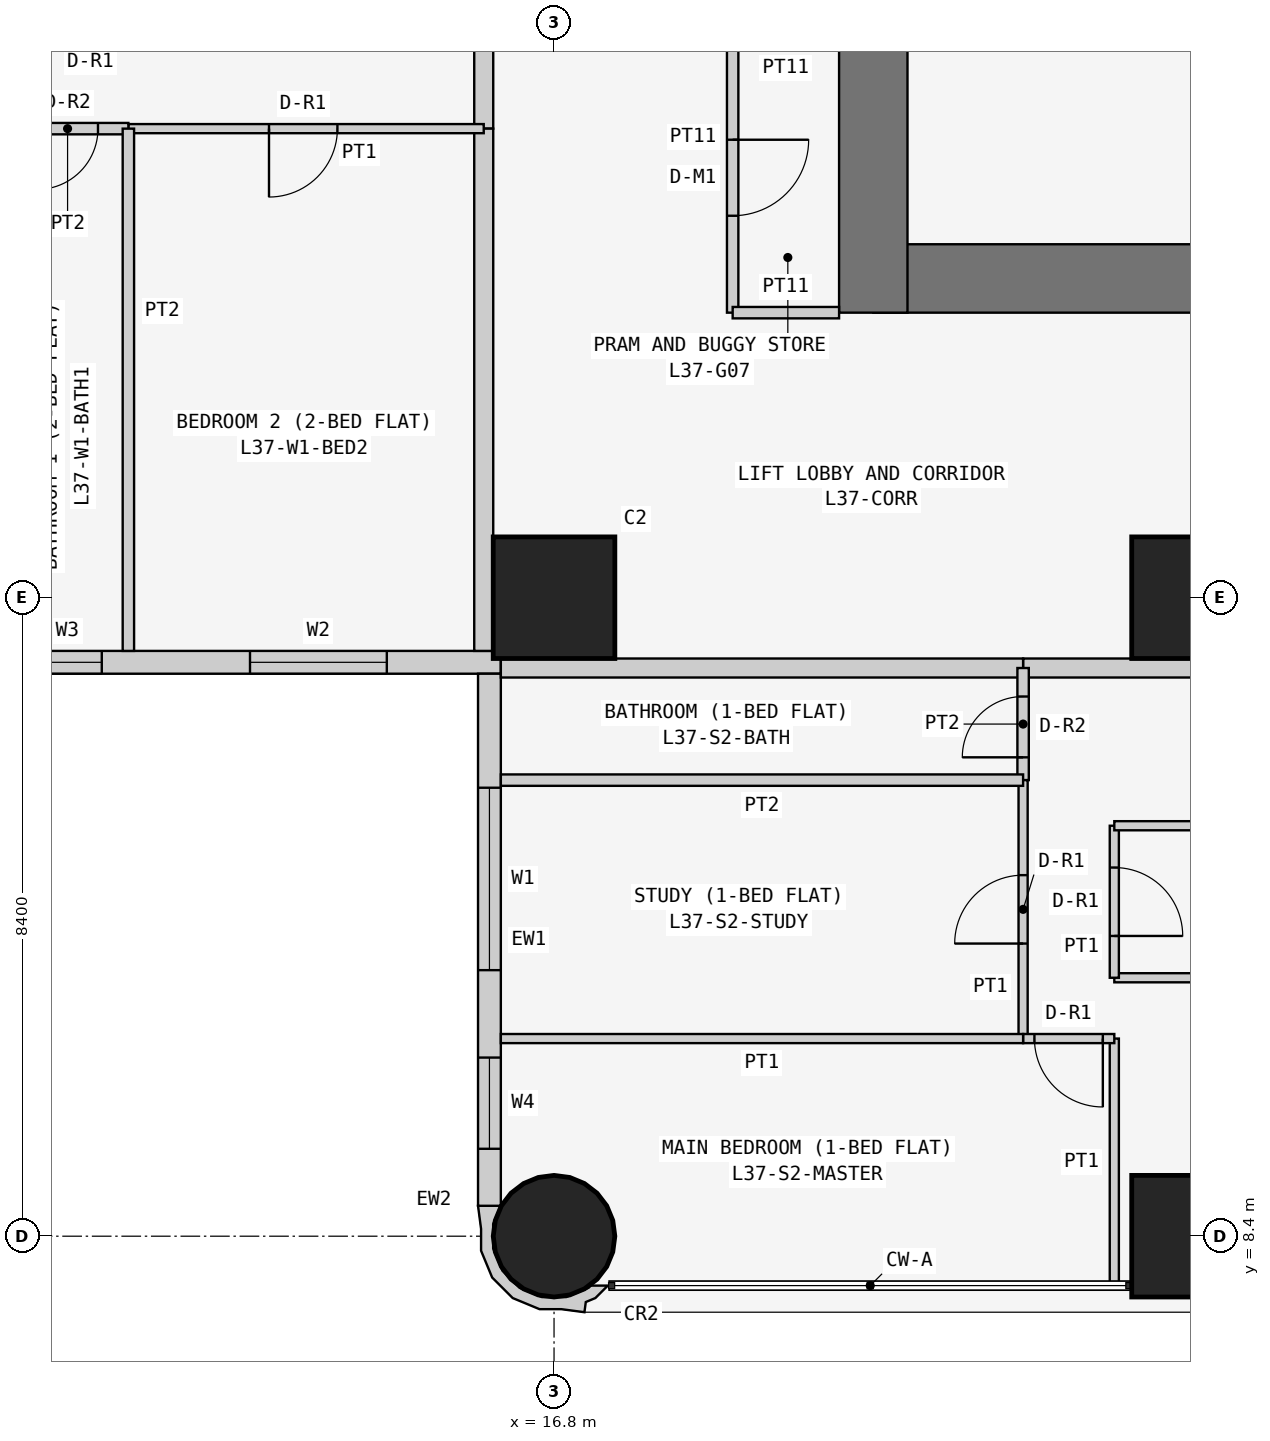
"""IFC4 building model, lengths in metres.
Left out: names, types, materials, properties, quantities, classifications, styles, units other than length and angle.
Written with IfcOpenShell. Run it as: python <this file> out.ifc"""

import sys

from ifc_helpers import new_model, si_unit, direction, frame, frame_2d, origin, origin_2d, place, context, subcontext, project, spatial, polyline, rectangle, circle, outline, extrude, element, fill, save


model = new_model("IFC4")
c1 = context("Model", 3, precision=1e-05, world=origin(), true_north=direction((0.0, 1.0)))
c2 = subcontext(c1, "Body", "Model", "MODEL_VIEW")
j1 = project(units=[si_unit("LENGTHUNIT", "METRE"), si_unit("PLANEANGLEUNIT", "RADIAN")], contexts=[c1])
p1 = place(None, origin())
s1 = spatial("IfcSite", under=j1, at=p1, CompositionType="ELEMENT")
p2 = place(p1, origin())
s2 = spatial("IfcBuilding", under=s1, at=p2, CompositionType="ELEMENT")
p3 = place(p2, frame((0.0, 0.0, 144.9)))
s3 = spatial("IfcBuildingStorey", under=s2, at=p3, CompositionType="ELEMENT", Elevation=144.9)
p4 = place(p3, frame((16.8, 8.4, 0.0), z_axis=(0.0, 0.0, 1.0), x_axis=(1.0, 0.0, 0.0)))
e1 = element("IfcColumn", 1, at=p4, inside=s3, PredefinedType="COLUMN", context=c2, shape_type="SweptSolid", body=[
    extrude(circle(Radius=0.8, at=origin_2d()), origin(), (0.0, 0.0, 1.0), 3.6),
])
for number, where, z_axis, x_axis in (
    (2, (16.8, 16.8, 0.0), (0.0, 0.0, 1.0), (1.0, 0.0, 0.0)),
    (3, (25.2, 8.4, 0.0), (0.0, 0.0, 1.0), (1.0, 0.0, 0.0)),
    (4, (25.2, 16.8, 0.0), (0.0, 0.0, 1.0), (1.0, 0.0, 0.0)),
):
    element("IfcColumn", number, at=place(p3, frame(where, z_axis=z_axis, x_axis=x_axis)), inside=s3, PredefinedType="COLUMN", context=c2, shape_type="SweptSolid", body=[
        extrude(rectangle(XDim=1.6, YDim=1.6, at=origin_2d()), origin(), (0.0, 0.0, 1.0), 3.6),
    ])
p5 = place(p3, frame((21.0, 21.0, 0.0), z_axis=(0.0, 0.0, 1.0), x_axis=(1.0, 0.0, 0.0)))
e5 = element("IfcWall", 5, at=p5, inside=s3, PredefinedType="SHEAR", context=c2, shape_type="SweptSolid", body=[
    extrude(rectangle(XDim=17.25, YDim=0.9, at=frame_2d((8.625, 0.0))), origin(), (0.0, 0.0, 1.0), 3.6),
])
p6 = place(p3, frame((21.0, 37.8, 0.0), z_axis=(0.0, 0.0, 1.0), x_axis=(0.0, -1.0, 0.0)))
e6 = element("IfcWall", 6, at=p6, inside=s3, PredefinedType="SHEAR", context=c2, shape_type="SweptSolid", body=[
    extrude(rectangle(XDim=17.25, YDim=0.9, at=frame_2d((8.625, 0.0))), origin(), (0.0, 0.0, 1.0), 3.6),
])
p7 = place(p6, frame((5.4, 0.0, 0.0)))
e7 = element("IfcOpeningElement", 7, at=p7, cuts=e6, PredefinedType="OPENING", context=c2, shape_type="SweptSolid", body=[
    extrude(rectangle(XDim=1.2, YDim=2.1, at=frame_2d((0.6, 1.05))), frame((0.0, 0.46, 0.0), z_axis=(0.0, -1.0, 0.0), x_axis=(1.0, 0.0, 0.0)), (0.0, 0.0, 1.0), 0.92),
])
p8 = place(p3, frame((0.4, 15.95, 0.0), z_axis=(0.0, 0.0, 1.0), x_axis=(1.0, 0.0, 0.0)))
e8 = element("IfcWall", 8, at=p8, inside=s3, PredefinedType="SOLIDWALL", context=c2, shape_type="SweptSolid", body=[
    extrude(rectangle(XDim=15.7, YDim=0.3, at=frame_2d((7.85, 0.0))), origin(), (0.0, 0.0, 1.0), 3.45),
])
p9 = place(p8, frame((12.4, 0.0, 0.9)))
e9 = element("IfcOpeningElement", 9, at=p9, cuts=e8, PredefinedType="OPENING", context=c2, shape_type="SweptSolid", body=[
    extrude(rectangle(XDim=1.8, YDim=1.5, at=frame_2d((0.9, 0.75))), frame((0.0, 0.16, 0.0), z_axis=(0.0, -1.0, 0.0), x_axis=(1.0, 0.0, 0.0)), (0.0, 0.0, 1.0), 0.32),
])
p10 = place(p8, frame((9.55, 0.0, 1.5)))
e10 = element("IfcOpeningElement", 10, at=p10, cuts=e8, PredefinedType="OPENING", context=c2, shape_type="SweptSolid", body=[
    extrude(rectangle(XDim=0.9, YDim=0.7, at=frame_2d((0.45, 0.35))), frame((0.0, 0.16, 0.0), z_axis=(0.0, -1.0, 0.0), x_axis=(1.0, 0.0, 0.0)), (0.0, 0.0, 1.0), 0.32),
])
p11 = place(p8, frame((5.1, 0.0, 0.9)))
e11 = element("IfcOpeningElement", 11, at=p11, cuts=e8, PredefinedType="OPENING", context=c2, shape_type="SweptSolid", body=[
    extrude(rectangle(XDim=1.8, YDim=1.5, at=frame_2d((0.9, 0.75))), frame((0.0, 0.16, 0.0), z_axis=(0.0, -1.0, 0.0), x_axis=(1.0, 0.0, 0.0)), (0.0, 0.0, 1.0), 0.32),
])
p12 = place(p8, frame((2.0, 0.0, 0.0)))
e12 = element("IfcOpeningElement", 12, at=p12, cuts=e8, PredefinedType="OPENING", context=c2, shape_type="SweptSolid", body=[
    extrude(rectangle(XDim=0.9, YDim=2.4, at=frame_2d((0.45, 1.2))), frame((0.0, 0.16, 0.0), z_axis=(0.0, -1.0, 0.0), x_axis=(1.0, 0.0, 0.0)), (0.0, 0.0, 1.0), 0.32),
])
p13 = place(p8, frame((0.7, 0.0, 0.9)))
e13 = element("IfcOpeningElement", 13, at=p13, cuts=e8, PredefinedType="OPENING", context=c2, shape_type="SweptSolid", body=[
    extrude(rectangle(XDim=1.2, YDim=1.5, at=frame_2d((0.6, 0.75))), frame((0.0, 0.16, 0.0), z_axis=(0.0, -1.0, 0.0), x_axis=(1.0, 0.0, 0.0)), (0.0, 0.0, 1.0), 0.32),
])
p14 = place(p3, frame((15.95, 15.8, 0.0), z_axis=(0.0, 0.0, 1.0), x_axis=(0.0, -1.0, 0.0)))
e14 = element("IfcWall", 14, at=p14, inside=s3, PredefinedType="SOLIDWALL", context=c2, shape_type="SweptSolid", body=[
    extrude(rectangle(XDim=7.0, YDim=0.3, at=frame_2d((3.5, 0.0))), origin(), (0.0, 0.0, 1.0), 3.45),
])
p15 = place(p14, frame((1.5, 0.0, 0.9)))
e15 = element("IfcOpeningElement", 15, at=p15, cuts=e14, PredefinedType="OPENING", context=c2, shape_type="SweptSolid", body=[
    extrude(rectangle(XDim=2.4, YDim=1.5, at=frame_2d((1.2, 0.75))), frame((0.0, 0.16, 0.0), z_axis=(0.0, -1.0, 0.0), x_axis=(1.0, 0.0, 0.0)), (0.0, 0.0, 1.0), 0.32),
])
p16 = place(p14, frame((5.05, 0.0, 0.9)))
e16 = element("IfcOpeningElement", 16, at=p16, cuts=e14, PredefinedType="OPENING", context=c2, shape_type="SweptSolid", body=[
    extrude(rectangle(XDim=1.2, YDim=1.5, at=frame_2d((0.6, 0.75))), frame((0.0, 0.16, 0.0), z_axis=(0.0, -1.0, 0.0), x_axis=(1.0, 0.0, 0.0)), (0.0, 0.0, 1.0), 0.32),
])
p17 = place(p3, frame((15.983, 8.727, 0.0), z_axis=(0.0, 0.0, 1.0), x_axis=(-0.343276641956, -0.93923434088, 0.0)))
e17 = element("IfcWall", 17, at=p17, inside=s3, PredefinedType="SOLIDWALL", context=c2, shape_type="SweptSolid", body=[
    extrude(outline(polyline([(0.829, 1.599), (0.697, 1.569), (0.604, 1.67), (0.394, 1.767), (0.471, 1.556), (0.509, 1.539), (0.724, 1.304), (0.833, 1.005), (0.82, 0.686), (0.686, 0.397), (0.451, 0.182), (0.152, 0.073), (-0.116, 0.084), (-0.127, 0.078), (-0.146, 0.071), (-0.006, -0.197), (0.266, -0.055), (0.535, 0.044), (0.817, 0.302), (0.978, 0.648), (0.994, 1.03), (0.895, 1.3), (0.829, 1.599)])), origin(), (0.0, 0.0, 1.0), 3.45),
])
p18 = place(p3, frame((19.15, 24.1, 0.0), z_axis=(0.0, 0.0, 1.0), x_axis=(0.0, -1.0, 0.0)))
e18 = element("IfcWall", 18, at=p18, inside=s3, PredefinedType="PARTITIONING", context=c2, shape_type="SweptSolid", body=[
    extrude(rectangle(XDim=3.55, YDim=0.15, at=frame_2d((1.775, 0.0))), origin(), (0.0, 0.0, 1.0), 3.45),
])
p19 = place(p18, frame((1.275, 0.0, 0.0)))
e19 = element("IfcOpeningElement", 19, at=p19, cuts=e18, PredefinedType="OPENING", context=c2, shape_type="SweptSolid", body=[
    extrude(rectangle(XDim=1.0, YDim=2.1, at=frame_2d((0.5, 1.05))), frame((0.0, 0.085, 0.0), z_axis=(0.0, -1.0, 0.0), x_axis=(1.0, 0.0, 0.0)), (0.0, 0.0, 1.0), 0.17),
])
p20 = place(p3, frame((19.15, 20.55, 0.0), z_axis=(0.0, 0.0, 1.0), x_axis=(1.0, 0.0, 0.0)))
e20 = element("IfcWall", 20, at=p20, inside=s3, PredefinedType="PARTITIONING", context=c2, shape_type="SweptSolid", body=[
    extrude(rectangle(XDim=1.4, YDim=0.15, at=frame_2d((0.7, 0.0))), origin(), (0.0, 0.0, 1.0), 3.45),
])
p21 = place(p3, frame((29.4, 15.875, 0.0), z_axis=(0.0, 0.0, 1.0), x_axis=(-1.0, 0.0, 0.0)))
e21 = element("IfcWall", 21, at=p21, inside=s3, PredefinedType="PARTITIONING", context=c2, shape_type="SweptSolid", body=[
    extrude(rectangle(XDim=6.429, YDim=0.25, at=frame_2d((3.214, 0.0))), origin(), (0.0, 0.0, 1.0), 3.45),
])
p22 = place(p21, frame((0.5, 0.0, 0.0)))
e22 = element("IfcOpeningElement", 22, at=p22, cuts=e21, PredefinedType="OPENING", context=c2, shape_type="SweptSolid", body=[
    extrude(rectangle(XDim=1.0, YDim=2.1, at=frame_2d((0.5, 1.05))), frame((0.0, 0.135, 0.0), z_axis=(0.0, -1.0, 0.0), x_axis=(1.0, 0.0, 0.0)), (0.0, 0.0, 1.0), 0.27),
])
p23 = place(p3, frame((22.971, 15.875, 0.0), z_axis=(0.0, 0.0, 1.0), x_axis=(-1.0, 0.0, 0.0)))
e23 = element("IfcWall", 23, at=p23, inside=s3, PredefinedType="PARTITIONING", context=c2, shape_type="SweptSolid", body=[
    extrude(rectangle(XDim=6.871, YDim=0.25, at=frame_2d((3.436, 0.0))), origin(), (0.0, 0.0, 1.0), 3.45),
])
p24 = place(p3, frame((15.875, 22.971, 0.0), z_axis=(0.0, 0.0, 1.0), x_axis=(0.0, 1.0, 0.0)))
e24 = element("IfcWall", 24, at=p24, inside=s3, PredefinedType="PARTITIONING", context=c2, shape_type="SweptSolid", body=[
    extrude(rectangle(XDim=1.2, YDim=0.25, at=frame_2d((0.6, 0.0))), origin(), (0.0, 0.0, 1.0), 3.45),
])
p25 = place(p3, frame((15.875, 16.1, 0.0), z_axis=(0.0, 0.0, 1.0), x_axis=(0.0, 1.0, 0.0)))
e25 = element("IfcWall", 25, at=p25, inside=s3, PredefinedType="PARTITIONING", context=c2, shape_type="SweptSolid", body=[
    extrude(rectangle(XDim=6.871, YDim=0.25, at=frame_2d((3.436, 0.0))), origin(), (0.0, 0.0, 1.0), 3.45),
])
p26 = place(p3, frame((29.4, 11.8, 0.0), z_axis=(0.0, 0.0, 1.0), x_axis=(-1.0, 0.0, 0.0)))
e26 = element("IfcWall", 26, at=p26, inside=s3, PredefinedType="PARTITIONING", context=c2, shape_type="SweptSolid", body=[
    extrude(rectangle(XDim=5.229, YDim=0.12, at=frame_2d((2.615, 0.0))), origin(), (0.0, 0.0, 1.0), 3.45),
])
p27 = place(p3, frame((24.171, 11.8, 0.0), z_axis=(0.0, 0.0, 1.0), x_axis=(0.0, 1.0, 0.0)))
e27 = element("IfcWall", 27, at=p27, inside=s3, PredefinedType="PARTITIONING", context=c2, shape_type="SweptSolid", body=[
    extrude(rectangle(XDim=2.0, YDim=0.12, at=frame_2d((1.0, 0.0))), origin(), (0.0, 0.0, 1.0), 3.45),
])
p28 = place(p27, frame((0.55, 0.0, 0.0)))
e28 = element("IfcOpeningElement", 28, at=p28, cuts=e27, PredefinedType="OPENING", context=c2, shape_type="SweptSolid", body=[
    extrude(rectangle(XDim=0.9, YDim=2.1, at=frame_2d((0.45, 1.05))), frame((0.0, 0.07, 0.0), z_axis=(0.0, -1.0, 0.0), x_axis=(1.0, 0.0, 0.0)), (0.0, 0.0, 1.0), 0.14),
])
p29 = place(p3, frame((24.171, 13.8, 0.0), z_axis=(0.0, 0.0, 1.0), x_axis=(1.0, 0.0, 0.0)))
e29 = element("IfcWall", 29, at=p29, inside=s3, PredefinedType="PARTITIONING", context=c2, shape_type="SweptSolid", body=[
    extrude(rectangle(XDim=5.229, YDim=0.12, at=frame_2d((2.615, 0.0))), origin(), (0.0, 0.0, 1.0), 3.45),
])
p30 = place(p3, frame((22.971, 14.4, 0.0), z_axis=(0.0, 0.0, 1.0), x_axis=(0.0, 1.0, 0.0)))
e30 = element("IfcWall", 30, at=p30, inside=s3, PredefinedType="PARTITIONING", context=c2, shape_type="SweptSolid", body=[
    extrude(rectangle(XDim=1.475, YDim=0.15, at=frame_2d((0.738, 0.0))), origin(), (0.0, 0.0, 1.0), 3.45),
])
p31 = place(p30, frame((0.3, 0.0, 0.0)))
e31 = element("IfcOpeningElement", 31, at=p31, cuts=e30, PredefinedType="OPENING", context=c2, shape_type="SweptSolid", body=[
    extrude(rectangle(XDim=0.8, YDim=2.1, at=frame_2d((0.4, 1.05))), frame((0.0, 0.085, 0.0), z_axis=(0.0, -1.0, 0.0), x_axis=(1.0, 0.0, 0.0)), (0.0, 0.0, 1.0), 0.17),
])
p32 = place(p3, frame((22.971, 11.0, 0.0), z_axis=(0.0, 0.0, 1.0), x_axis=(0.0, 1.0, 0.0)))
e32 = element("IfcWall", 32, at=p32, inside=s3, PredefinedType="PARTITIONING", context=c2, shape_type="SweptSolid", body=[
    extrude(rectangle(XDim=3.4, YDim=0.12, at=frame_2d((1.7, 0.0))), origin(), (0.0, 0.0, 1.0), 3.45),
])
p33 = place(p32, frame((1.25, 0.0, 0.0)))
e33 = element("IfcOpeningElement", 33, at=p33, cuts=e32, PredefinedType="OPENING", context=c2, shape_type="SweptSolid", body=[
    extrude(rectangle(XDim=0.9, YDim=2.1, at=frame_2d((0.45, 1.05))), frame((0.0, 0.07, 0.0), z_axis=(0.0, -1.0, 0.0), x_axis=(1.0, 0.0, 0.0)), (0.0, 0.0, 1.0), 0.14),
])
p34 = place(p3, frame((24.171, 7.75, 0.0), z_axis=(0.0, 0.0, 1.0), x_axis=(0.0, 1.0, 0.0)))
e34 = element("IfcWall", 34, at=p34, inside=s3, PredefinedType="PARTITIONING", context=c2, shape_type="SweptSolid", body=[
    extrude(rectangle(XDim=3.25, YDim=0.12, at=frame_2d((1.625, 0.0))), origin(), (0.0, 0.0, 1.0), 3.45),
])
p35 = place(p3, frame((24.171, 11.0, 0.0), z_axis=(0.0, 0.0, 1.0), x_axis=(-1.0, 0.0, 0.0)))
e35 = element("IfcWall", 35, at=p35, inside=s3, PredefinedType="PARTITIONING", context=c2, shape_type="SweptSolid", body=[
    extrude(rectangle(XDim=1.2, YDim=0.12, at=frame_2d((0.6, 0.0))), origin(), (0.0, 0.0, 1.0), 3.45),
])
p36 = place(p35, frame((0.151, 0.0, 0.0)))
e36 = element("IfcOpeningElement", 36, at=p36, cuts=e35, PredefinedType="OPENING", context=c2, shape_type="SweptSolid", body=[
    extrude(rectangle(XDim=0.9, YDim=2.1, at=frame_2d((0.45, 1.05))), frame((0.0, 0.07, 0.0), z_axis=(0.0, -1.0, 0.0), x_axis=(1.0, 0.0, 0.0)), (0.0, 0.0, 1.0), 0.14),
])
p37 = place(p3, frame((22.971, 14.4, 0.0), z_axis=(0.0, 0.0, 1.0), x_axis=(-1.0, 0.0, 0.0)))
e37 = element("IfcWall", 37, at=p37, inside=s3, PredefinedType="PARTITIONING", context=c2, shape_type="SweptSolid", body=[
    extrude(rectangle(XDim=6.871, YDim=0.15, at=frame_2d((3.436, 0.0))), origin(), (0.0, 0.0, 1.0), 3.45),
])
p38 = place(p3, frame((22.971, 11.0, 0.0), z_axis=(0.0, 0.0, 1.0), x_axis=(-1.0, 0.0, 0.0)))
e38 = element("IfcWall", 38, at=p38, inside=s3, PredefinedType="PARTITIONING", context=c2, shape_type="SweptSolid", body=[
    extrude(rectangle(XDim=6.871, YDim=0.12, at=frame_2d((3.436, 0.0))), origin(), (0.0, 0.0, 1.0), 3.45),
])
p39 = place(p3, frame((11.2, 22.971, 0.0), z_axis=(0.0, 0.0, 1.0), x_axis=(1.0, 0.0, 0.0)))
e39 = element("IfcWall", 39, at=p39, inside=s3, PredefinedType="PARTITIONING", context=c2, shape_type="SweptSolid", body=[
    extrude(rectangle(XDim=4.675, YDim=0.12, at=frame_2d((2.337, 0.0))), origin(), (0.0, 0.0, 1.0), 3.45),
])
p40 = place(p39, frame((1.85, 0.0, 0.0)))
e40 = element("IfcOpeningElement", 40, at=p40, cuts=e39, PredefinedType="OPENING", context=c2, shape_type="SweptSolid", body=[
    extrude(rectangle(XDim=0.9, YDim=2.1, at=frame_2d((0.45, 1.05))), frame((0.0, 0.07, 0.0), z_axis=(0.0, -1.0, 0.0), x_axis=(1.0, 0.0, 0.0)), (0.0, 0.0, 1.0), 0.14),
])
p41 = place(p3, frame((9.6, 22.971, 0.0), z_axis=(0.0, 0.0, 1.0), x_axis=(1.0, 0.0, 0.0)))
e41 = element("IfcWall", 41, at=p41, inside=s3, PredefinedType="PARTITIONING", context=c2, shape_type="SweptSolid", body=[
    extrude(rectangle(XDim=1.6, YDim=0.15, at=frame_2d((0.8, 0.0))), origin(), (0.0, 0.0, 1.0), 3.45),
])
p42 = place(p41, frame((0.4, 0.0, 0.0)))
e42 = element("IfcOpeningElement", 42, at=p42, cuts=e41, PredefinedType="OPENING", context=c2, shape_type="SweptSolid", body=[
    extrude(rectangle(XDim=0.8, YDim=2.1, at=frame_2d((0.4, 1.05))), frame((0.0, 0.085, 0.0), z_axis=(0.0, -1.0, 0.0), x_axis=(1.0, 0.0, 0.0)), (0.0, 0.0, 1.0), 0.17),
])
p43 = place(p3, frame((11.2, 22.971, 0.0), z_axis=(0.0, 0.0, 1.0), x_axis=(0.0, -1.0, 0.0)))
e43 = element("IfcWall", 43, at=p43, inside=s3, PredefinedType="PARTITIONING", context=c2, shape_type="SweptSolid", body=[
    extrude(rectangle(XDim=6.871, YDim=0.15, at=frame_2d((3.436, 0.0))), origin(), (0.0, 0.0, 1.0), 3.45),
])
p44 = place(p15, origin())
e44 = element("IfcWindow", 44, at=p44, inside=s3, PartitioningType="SINGLE_PANEL", PredefinedType="WINDOW", context=c2, shape_type="SweptSolid", body=[
    extrude(rectangle(XDim=2.4, YDim=1.5, at=frame_2d((1.2, 0.75))), frame((0.0, 0.03, 0.0), z_axis=(0.0, -1.0, 0.0), x_axis=(1.0, 0.0, 0.0)), (0.0, 0.0, 1.0), 0.06),
])
fill(e15, e44)
p45 = place(p16, origin())
e45 = element("IfcWindow", 45, at=p45, inside=s3, PartitioningType="SINGLE_PANEL", PredefinedType="WINDOW", context=c2, shape_type="SweptSolid", body=[
    extrude(rectangle(XDim=1.2, YDim=1.5, at=frame_2d((0.6, 0.75))), frame((0.0, 0.03, 0.0), z_axis=(0.0, -1.0, 0.0), x_axis=(1.0, 0.0, 0.0)), (0.0, 0.0, 1.0), 0.06),
])
fill(e16, e45)
p46 = place(p9, origin())
e46 = element("IfcWindow", 46, at=p46, inside=s3, PartitioningType="SINGLE_PANEL", PredefinedType="WINDOW", context=c2, shape_type="SweptSolid", body=[
    extrude(rectangle(XDim=1.8, YDim=1.5, at=frame_2d((0.9, 0.75))), frame((0.0, 0.03, 0.0), z_axis=(0.0, -1.0, 0.0), x_axis=(1.0, 0.0, 0.0)), (0.0, 0.0, 1.0), 0.06),
])
fill(e9, e46)
p47 = place(p10, origin())
e47 = element("IfcWindow", 47, at=p47, inside=s3, PartitioningType="SINGLE_PANEL", PredefinedType="WINDOW", context=c2, shape_type="SweptSolid", body=[
    extrude(rectangle(XDim=0.9, YDim=0.7, at=frame_2d((0.45, 0.35))), frame((0.0, 0.03, 0.0), z_axis=(0.0, -1.0, 0.0), x_axis=(1.0, 0.0, 0.0)), (0.0, 0.0, 1.0), 0.06),
])
fill(e10, e47)
p48 = place(p19, origin())
e48 = element("IfcDoor", 48, at=p48, inside=s3, OperationType="SINGLE_SWING_LEFT", PredefinedType="DOOR", context=c2, shape_type="SweptSolid", body=[
    extrude(rectangle(XDim=1.0, YDim=2.1, at=frame_2d((0.5, 1.05))), frame((0.0, 0.025, 0.0), z_axis=(0.0, -1.0, 0.0), x_axis=(1.0, 0.0, 0.0)), (0.0, 0.0, 1.0), 0.05),
])
fill(e19, e48)
p49 = place(p28, frame((0.9, 0.0, 0.0), z_axis=(0.0, 0.0, 1.0), x_axis=(-1.0, 0.0, 0.0)))
e49 = element("IfcDoor", 49, at=p49, inside=s3, OperationType="SINGLE_SWING_RIGHT", PredefinedType="DOOR", context=c2, shape_type="SweptSolid", body=[
    extrude(rectangle(XDim=0.9, YDim=2.1, at=frame_2d((0.45, 1.05))), frame((0.0, 0.025, 0.0), z_axis=(0.0, -1.0, 0.0), x_axis=(1.0, 0.0, 0.0)), (0.0, 0.0, 1.0), 0.05),
])
fill(e28, e49)
p50 = place(p31, origin())
e50 = element("IfcDoor", 50, at=p50, inside=s3, OperationType="SINGLE_SWING_LEFT", PredefinedType="DOOR", context=c2, shape_type="SweptSolid", body=[
    extrude(rectangle(XDim=0.8, YDim=2.1, at=frame_2d((0.4, 1.05))), frame((0.0, 0.025, 0.0), z_axis=(0.0, -1.0, 0.0), x_axis=(1.0, 0.0, 0.0)), (0.0, 0.0, 1.0), 0.05),
])
fill(e31, e50)
p51 = place(p33, origin())
e51 = element("IfcDoor", 51, at=p51, inside=s3, OperationType="SINGLE_SWING_LEFT", PredefinedType="DOOR", context=c2, shape_type="SweptSolid", body=[
    extrude(rectangle(XDim=0.9, YDim=2.1, at=frame_2d((0.45, 1.05))), frame((0.0, 0.025, 0.0), z_axis=(0.0, -1.0, 0.0), x_axis=(1.0, 0.0, 0.0)), (0.0, 0.0, 1.0), 0.05),
])
fill(e33, e51)
p52 = place(p36, origin())
e52 = element("IfcDoor", 52, at=p52, inside=s3, OperationType="SINGLE_SWING_LEFT", PredefinedType="DOOR", context=c2, shape_type="SweptSolid", body=[
    extrude(rectangle(XDim=0.9, YDim=2.1, at=frame_2d((0.45, 1.05))), frame((0.0, 0.025, 0.0), z_axis=(0.0, -1.0, 0.0), x_axis=(1.0, 0.0, 0.0)), (0.0, 0.0, 1.0), 0.05),
])
fill(e36, e52)
p53 = place(p40, frame((0.9, 0.0, 0.0), z_axis=(0.0, 0.0, 1.0), x_axis=(-1.0, 0.0, 0.0)))
e53 = element("IfcDoor", 53, at=p53, inside=s3, OperationType="SINGLE_SWING_RIGHT", PredefinedType="DOOR", context=c2, shape_type="SweptSolid", body=[
    extrude(rectangle(XDim=0.9, YDim=2.1, at=frame_2d((0.45, 1.05))), frame((0.0, 0.025, 0.0), z_axis=(0.0, -1.0, 0.0), x_axis=(1.0, 0.0, 0.0)), (0.0, 0.0, 1.0), 0.05),
])
fill(e40, e53)
p54 = place(p42, frame((0.8, 0.0, 0.0), z_axis=(0.0, 0.0, 1.0), x_axis=(-1.0, 0.0, 0.0)))
e54 = element("IfcDoor", 54, at=p54, inside=s3, OperationType="SINGLE_SWING_RIGHT", PredefinedType="DOOR", context=c2, shape_type="SweptSolid", body=[
    extrude(rectangle(XDim=0.8, YDim=2.1, at=frame_2d((0.4, 1.05))), frame((0.0, 0.025, 0.0), z_axis=(0.0, -1.0, 0.0), x_axis=(1.0, 0.0, 0.0)), (0.0, 0.0, 1.0), 0.05),
])
fill(e42, e54)
save(model, sys.argv[1])
